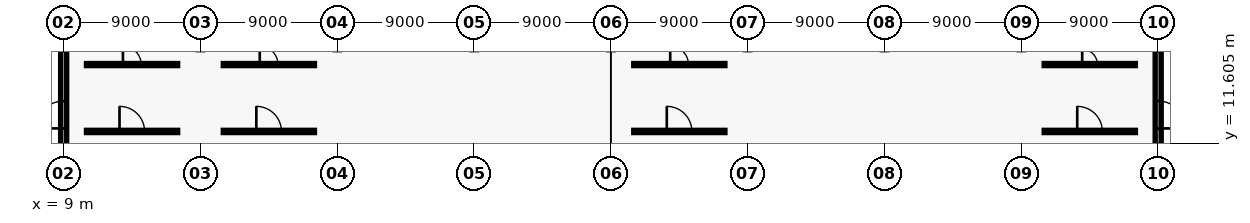
"""IFC4 building model, lengths in metres.
Left out: names, types, materials, properties, quantities, classifications, styles, units other than length and angle.
Written with IfcOpenShell. Run it as: python <this file> out.ifc"""

import sys

from ifc_helpers import new_model, si_unit, direction, frame, frame_2d, origin, place, context, subcontext, project, spatial, rectangle, extrude, element, fill, save


model = new_model("IFC4")
c1 = context("Model", 3, precision=1e-05, world=origin(), true_north=direction((0.0, 1.0)))
c2 = subcontext(c1, "Body", "Model", "MODEL_VIEW")
j1 = project(units=[si_unit("LENGTHUNIT", "METRE"), si_unit("PLANEANGLEUNIT", "RADIAN")], contexts=[c1])
p1 = place(None, origin())
s1 = spatial("IfcSite", under=j1, at=p1, CompositionType="ELEMENT")
p2 = place(p1, origin())
s2 = spatial("IfcBuilding", under=s1, at=p2, CompositionType="ELEMENT")
p3 = place(p2, origin())
s3 = spatial("IfcBuildingStorey", under=s2, at=p3, CompositionType="ELEMENT", Elevation=0.0)
p4 = place(p3, frame((9.0, 9.06, 0.0), z_axis=(0.0, 0.0, 1.0), x_axis=(0.0, 1.0, 0.0)))
e1 = element("IfcWall", 1, at=p4, inside=s3, PredefinedType="SOLIDWALL", context=c2, shape_type="SweptSolid", body=[
    extrude(rectangle(XDim=8.88, YDim=0.4, at=frame_2d((4.44, 0.0))), origin(), (0.0, 0.0, 1.0), 4.7),
])
p5 = place(p4, frame((3.54, 0.0, 0.0)))
e2 = element("IfcOpeningElement", 2, at=p5, cuts=e1, PredefinedType="OPENING", context=c2, shape_type="SweptSolid", body=[
    extrude(rectangle(XDim=1.8, YDim=2.2, at=frame_2d((0.9, 1.1))), frame((0.0, 0.21, 0.0), z_axis=(0.0, -1.0, 0.0), x_axis=(1.0, 0.0, 0.0)), (0.0, 0.0, 1.0), 0.42),
])
p6 = place(p3, frame((81.0, 9.06, 0.0), z_axis=(0.0, 0.0, 1.0), x_axis=(0.0, 1.0, 0.0)))
e3 = element("IfcWall", 3, at=p6, inside=s3, PredefinedType="SOLIDWALL", context=c2, shape_type="SweptSolid", body=[
    extrude(rectangle(XDim=8.88, YDim=0.4, at=frame_2d((4.44, 0.0))), origin(), (0.0, 0.0, 1.0), 4.7),
])
p7 = place(p6, frame((3.54, 0.0, 0.0)))
e4 = element("IfcOpeningElement", 4, at=p7, cuts=e3, PredefinedType="OPENING", context=c2, shape_type="SweptSolid", body=[
    extrude(rectangle(XDim=1.8, YDim=2.2, at=frame_2d((0.9, 1.1))), frame((0.0, 0.21, 0.0), z_axis=(0.0, -1.0, 0.0), x_axis=(1.0, 0.0, 0.0)), (0.0, 0.0, 1.0), 0.42),
])
p8 = place(p3, frame((10.5, 12.4, 0.0), z_axis=(0.0, 0.0, 1.0), x_axis=(1.0, 0.0, 0.0)))
e5 = element("IfcWall", 5, at=p8, inside=s3, PredefinedType="PARTITIONING", context=c2, shape_type="SweptSolid", body=[
    extrude(rectangle(XDim=6.0, YDim=0.15, at=frame_2d((3.0, 0.0))), origin(), (0.0, 0.0, 1.0), 4.3),
])
p9 = place(p8, frame((2.175, 0.0, 0.0)))
e6 = element("IfcOpeningElement", 6, at=p9, cuts=e5, PredefinedType="OPENING", context=c2, shape_type="SweptSolid", body=[
    extrude(rectangle(XDim=1.65, YDim=2.25, at=frame_2d((0.825, 1.125))), frame((0.0, 0.085, 0.0), z_axis=(0.0, -1.0, 0.0), x_axis=(1.0, 0.0, 0.0)), (0.0, 0.0, 1.0), 0.17),
])
p10 = place(p3, frame((10.5, 16.8, 0.0), z_axis=(0.0, 0.0, 1.0), x_axis=(1.0, 0.0, 0.0)))
e7 = element("IfcWall", 7, at=p10, inside=s3, PredefinedType="PARTITIONING", context=c2, shape_type="SweptSolid", body=[
    extrude(rectangle(XDim=6.0, YDim=0.14, at=frame_2d((3.0, 0.0))), origin(), (0.0, 0.0, 1.0), 4.3),
])
p11 = place(p10, frame((2.4, 0.0, 0.0)))
e8 = element("IfcOpeningElement", 8, at=p11, cuts=e7, PredefinedType="OPENING", context=c2, shape_type="SweptSolid", body=[
    extrude(rectangle(XDim=1.2, YDim=2.2, at=frame_2d((0.6, 1.1))), frame((0.0, 0.08, 0.0), z_axis=(0.0, -1.0, 0.0), x_axis=(1.0, 0.0, 0.0)), (0.0, 0.0, 1.0), 0.16),
])
p12 = place(p3, frame((19.5, 12.4, 0.0), z_axis=(0.0, 0.0, 1.0), x_axis=(1.0, 0.0, 0.0)))
e9 = element("IfcWall", 9, at=p12, inside=s3, PredefinedType="PARTITIONING", context=c2, shape_type="SweptSolid", body=[
    extrude(rectangle(XDim=6.0, YDim=0.15, at=frame_2d((3.0, 0.0))), origin(), (0.0, 0.0, 1.0), 4.3),
])
p13 = place(p12, frame((2.175, 0.0, 0.0)))
e10 = element("IfcOpeningElement", 10, at=p13, cuts=e9, PredefinedType="OPENING", context=c2, shape_type="SweptSolid", body=[
    extrude(rectangle(XDim=1.65, YDim=2.25, at=frame_2d((0.825, 1.125))), frame((0.0, 0.085, 0.0), z_axis=(0.0, -1.0, 0.0), x_axis=(1.0, 0.0, 0.0)), (0.0, 0.0, 1.0), 0.17),
])
p14 = place(p3, frame((19.5, 16.8, 0.0), z_axis=(0.0, 0.0, 1.0), x_axis=(1.0, 0.0, 0.0)))
e11 = element("IfcWall", 11, at=p14, inside=s3, PredefinedType="PARTITIONING", context=c2, shape_type="SweptSolid", body=[
    extrude(rectangle(XDim=6.0, YDim=0.14, at=frame_2d((3.0, 0.0))), origin(), (0.0, 0.0, 1.0), 4.3),
])
p15 = place(p14, frame((2.4, 0.0, 0.0)))
e12 = element("IfcOpeningElement", 12, at=p15, cuts=e11, PredefinedType="OPENING", context=c2, shape_type="SweptSolid", body=[
    extrude(rectangle(XDim=1.2, YDim=2.2, at=frame_2d((0.6, 1.1))), frame((0.0, 0.08, 0.0), z_axis=(0.0, -1.0, 0.0), x_axis=(1.0, 0.0, 0.0)), (0.0, 0.0, 1.0), 0.16),
])
p16 = place(p3, frame((46.5, 12.4, 0.0), z_axis=(0.0, 0.0, 1.0), x_axis=(1.0, 0.0, 0.0)))
e13 = element("IfcWall", 13, at=p16, inside=s3, PredefinedType="PARTITIONING", context=c2, shape_type="SweptSolid", body=[
    extrude(rectangle(XDim=6.0, YDim=0.15, at=frame_2d((3.0, 0.0))), origin(), (0.0, 0.0, 1.0), 4.3),
])
p17 = place(p16, frame((2.175, 0.0, 0.0)))
e14 = element("IfcOpeningElement", 14, at=p17, cuts=e13, PredefinedType="OPENING", context=c2, shape_type="SweptSolid", body=[
    extrude(rectangle(XDim=1.65, YDim=2.25, at=frame_2d((0.825, 1.125))), frame((0.0, 0.085, 0.0), z_axis=(0.0, -1.0, 0.0), x_axis=(1.0, 0.0, 0.0)), (0.0, 0.0, 1.0), 0.17),
])
p18 = place(p3, frame((46.5, 16.8, 0.0), z_axis=(0.0, 0.0, 1.0), x_axis=(1.0, 0.0, 0.0)))
e15 = element("IfcWall", 15, at=p18, inside=s3, PredefinedType="PARTITIONING", context=c2, shape_type="SweptSolid", body=[
    extrude(rectangle(XDim=6.0, YDim=0.14, at=frame_2d((3.0, 0.0))), origin(), (0.0, 0.0, 1.0), 4.3),
])
p19 = place(p18, frame((2.4, 0.0, 0.0)))
e16 = element("IfcOpeningElement", 16, at=p19, cuts=e15, PredefinedType="OPENING", context=c2, shape_type="SweptSolid", body=[
    extrude(rectangle(XDim=1.2, YDim=2.2, at=frame_2d((0.6, 1.1))), frame((0.0, 0.08, 0.0), z_axis=(0.0, -1.0, 0.0), x_axis=(1.0, 0.0, 0.0)), (0.0, 0.0, 1.0), 0.16),
])
p20 = place(p3, frame((73.5, 12.4, 0.0), z_axis=(0.0, 0.0, 1.0), x_axis=(1.0, 0.0, 0.0)))
e17 = element("IfcWall", 17, at=p20, inside=s3, PredefinedType="PARTITIONING", context=c2, shape_type="SweptSolid", body=[
    extrude(rectangle(XDim=6.0, YDim=0.15, at=frame_2d((3.0, 0.0))), origin(), (0.0, 0.0, 1.0), 4.3),
])
p21 = place(p20, frame((2.175, 0.0, 0.0)))
e18 = element("IfcOpeningElement", 18, at=p21, cuts=e17, PredefinedType="OPENING", context=c2, shape_type="SweptSolid", body=[
    extrude(rectangle(XDim=1.65, YDim=2.25, at=frame_2d((0.825, 1.125))), frame((0.0, 0.085, 0.0), z_axis=(0.0, -1.0, 0.0), x_axis=(1.0, 0.0, 0.0)), (0.0, 0.0, 1.0), 0.17),
])
p22 = place(p3, frame((73.5, 16.8, 0.0), z_axis=(0.0, 0.0, 1.0), x_axis=(1.0, 0.0, 0.0)))
e19 = element("IfcWall", 19, at=p22, inside=s3, PredefinedType="PARTITIONING", context=c2, shape_type="SweptSolid", body=[
    extrude(rectangle(XDim=6.0, YDim=0.14, at=frame_2d((3.0, 0.0))), origin(), (0.0, 0.0, 1.0), 4.3),
])
p23 = place(p22, frame((2.5, 0.0, 0.0)))
e20 = element("IfcOpeningElement", 20, at=p23, cuts=e19, PredefinedType="OPENING", context=c2, shape_type="SweptSolid", body=[
    extrude(rectangle(XDim=1.0, YDim=2.1, at=frame_2d((0.5, 1.05))), frame((0.0, 0.08, 0.0), z_axis=(0.0, -1.0, 0.0), x_axis=(1.0, 0.0, 0.0)), (0.0, 0.0, 1.0), 0.16),
])
p24 = place(p5, origin())
e21 = element("IfcDoor", 21, at=p24, inside=s3, OperationType="DOUBLE_DOOR_SINGLE_SWING", PredefinedType="DOOR", context=c2, shape_type="SweptSolid", body=[
    extrude(rectangle(XDim=1.8, YDim=2.2, at=frame_2d((0.9, 1.1))), frame((0.0, 0.025, 0.0), z_axis=(0.0, -1.0, 0.0), x_axis=(1.0, 0.0, 0.0)), (0.0, 0.0, 1.0), 0.05),
])
fill(e2, e21)
p25 = place(p7, frame((1.8, 0.0, 0.0), z_axis=(0.0, 0.0, 1.0), x_axis=(-1.0, 0.0, 0.0)))
e22 = element("IfcDoor", 22, at=p25, inside=s3, OperationType="DOUBLE_DOOR_SINGLE_SWING", PredefinedType="DOOR", context=c2, shape_type="SweptSolid", body=[
    extrude(rectangle(XDim=1.8, YDim=2.2, at=frame_2d((0.9, 1.1))), frame((0.0, 0.025, 0.0), z_axis=(0.0, -1.0, 0.0), x_axis=(1.0, 0.0, 0.0)), (0.0, 0.0, 1.0), 0.05),
])
fill(e4, e22)
p26 = place(p9, origin())
e23 = element("IfcDoor", 23, at=p26, inside=s3, OperationType="DOUBLE_DOOR_SINGLE_SWING", PredefinedType="DOOR", context=c2, shape_type="SweptSolid", body=[
    extrude(rectangle(XDim=1.65, YDim=2.25, at=frame_2d((0.825, 1.125))), frame((0.0, 0.025, 0.0), z_axis=(0.0, -1.0, 0.0), x_axis=(1.0, 0.0, 0.0)), (0.0, 0.0, 1.0), 0.05),
])
fill(e6, e23)
p27 = place(p11, origin())
e24 = element("IfcDoor", 24, at=p27, inside=s3, OperationType="SINGLE_SWING_LEFT", PredefinedType="DOOR", context=c2, shape_type="SweptSolid", body=[
    extrude(rectangle(XDim=1.2, YDim=2.2, at=frame_2d((0.6, 1.1))), frame((0.0, 0.025, 0.0), z_axis=(0.0, -1.0, 0.0), x_axis=(1.0, 0.0, 0.0)), (0.0, 0.0, 1.0), 0.05),
])
fill(e8, e24)
p28 = place(p13, origin())
e25 = element("IfcDoor", 25, at=p28, inside=s3, OperationType="DOUBLE_DOOR_SINGLE_SWING", PredefinedType="DOOR", context=c2, shape_type="SweptSolid", body=[
    extrude(rectangle(XDim=1.65, YDim=2.25, at=frame_2d((0.825, 1.125))), frame((0.0, 0.025, 0.0), z_axis=(0.0, -1.0, 0.0), x_axis=(1.0, 0.0, 0.0)), (0.0, 0.0, 1.0), 0.05),
])
fill(e10, e25)
p29 = place(p15, origin())
e26 = element("IfcDoor", 26, at=p29, inside=s3, OperationType="SINGLE_SWING_LEFT", PredefinedType="DOOR", context=c2, shape_type="SweptSolid", body=[
    extrude(rectangle(XDim=1.2, YDim=2.2, at=frame_2d((0.6, 1.1))), frame((0.0, 0.025, 0.0), z_axis=(0.0, -1.0, 0.0), x_axis=(1.0, 0.0, 0.0)), (0.0, 0.0, 1.0), 0.05),
])
fill(e12, e26)
p30 = place(p17, origin())
e27 = element("IfcDoor", 27, at=p30, inside=s3, OperationType="DOUBLE_DOOR_SINGLE_SWING", PredefinedType="DOOR", context=c2, shape_type="SweptSolid", body=[
    extrude(rectangle(XDim=1.65, YDim=2.25, at=frame_2d((0.825, 1.125))), frame((0.0, 0.025, 0.0), z_axis=(0.0, -1.0, 0.0), x_axis=(1.0, 0.0, 0.0)), (0.0, 0.0, 1.0), 0.05),
])
fill(e14, e27)
p31 = place(p19, origin())
e28 = element("IfcDoor", 28, at=p31, inside=s3, OperationType="SINGLE_SWING_LEFT", PredefinedType="DOOR", context=c2, shape_type="SweptSolid", body=[
    extrude(rectangle(XDim=1.2, YDim=2.2, at=frame_2d((0.6, 1.1))), frame((0.0, 0.025, 0.0), z_axis=(0.0, -1.0, 0.0), x_axis=(1.0, 0.0, 0.0)), (0.0, 0.0, 1.0), 0.05),
])
fill(e16, e28)
p32 = place(p21, origin())
e29 = element("IfcDoor", 29, at=p32, inside=s3, OperationType="DOUBLE_DOOR_SINGLE_SWING", PredefinedType="DOOR", context=c2, shape_type="SweptSolid", body=[
    extrude(rectangle(XDim=1.65, YDim=2.25, at=frame_2d((0.825, 1.125))), frame((0.0, 0.025, 0.0), z_axis=(0.0, -1.0, 0.0), x_axis=(1.0, 0.0, 0.0)), (0.0, 0.0, 1.0), 0.05),
])
fill(e18, e29)
p33 = place(p23, origin())
e30 = element("IfcDoor", 30, at=p33, inside=s3, OperationType="SINGLE_SWING_LEFT", PredefinedType="DOOR", context=c2, shape_type="SweptSolid", body=[
    extrude(rectangle(XDim=1.0, YDim=2.1, at=frame_2d((0.5, 1.05))), frame((0.0, 0.025, 0.0), z_axis=(0.0, -1.0, 0.0), x_axis=(1.0, 0.0, 0.0)), (0.0, 0.0, 1.0), 0.05),
])
fill(e20, e30)
save(model, sys.argv[1])
